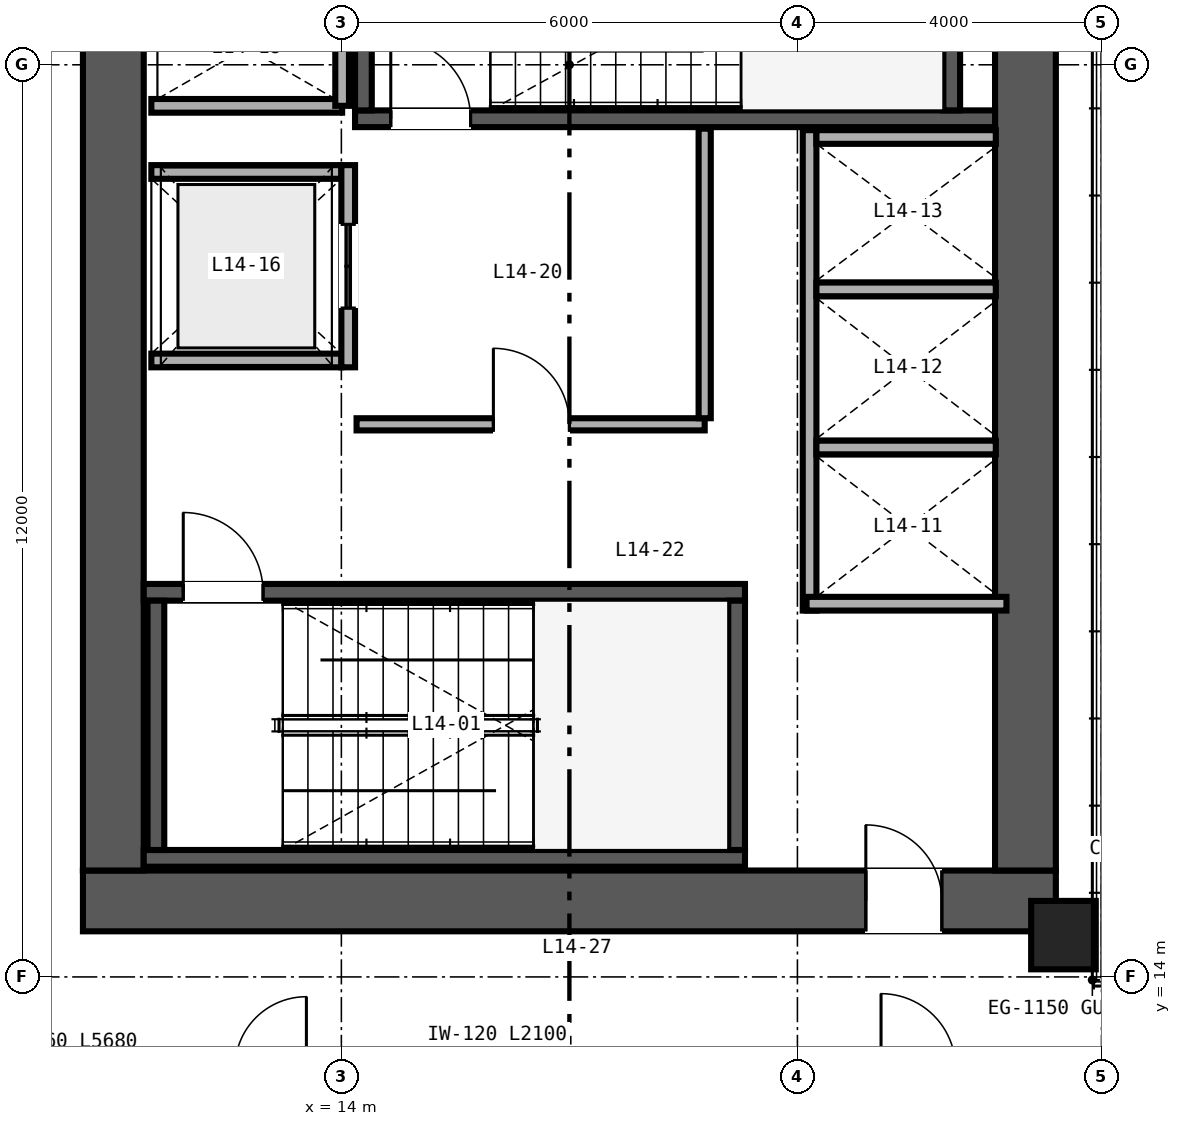
"""IFC4 building model, lengths in metres.
Left out: names, types, materials, properties, quantities, classifications, styles, units other than length and angle.
Written with IfcOpenShell. Run it as: python <this file> out.ifc"""

import sys

from ifc_helpers import new_model, si_unit, direction, frame, frame_2d, origin, origin_2d, place, context, subcontext, project, spatial, rectangle, hollow_rectangle, extrude, source, transform, mapped, element, fill, save


model = new_model("IFC4")
c1 = context("Model", 3, precision=1e-05, world=origin(), true_north=direction((0.0, 1.0)))
c2 = subcontext(c1, "Body", "Model", "MODEL_VIEW")
j1 = project(units=[si_unit("LENGTHUNIT", "METRE"), si_unit("PLANEANGLEUNIT", "RADIAN")], contexts=[c1])
p1 = place(None, origin())
s1 = spatial("IfcSite", under=j1, at=p1, CompositionType="ELEMENT")
p2 = place(p1, origin())
s2 = spatial("IfcBuilding", under=s1, at=p2, CompositionType="ELEMENT")
p3 = place(p2, frame((0.0, 0.0, 60.0)))
s3 = spatial("IfcBuildingStorey", under=s2, at=p3, CompositionType="ELEMENT", Elevation=60.0)
p4 = place(p3, frame((10.6, 15.0, 0.0), z_axis=(0.0, 0.0, 1.0), x_axis=(1.0, 0.0, 0.0)))
e1 = element("IfcWall", 1, at=p4, inside=s3, PredefinedType="SHEAR", context=c2, shape_type="SweptSolid", body=[
    extrude(rectangle(XDim=12.8, YDim=0.8, at=frame_2d((6.4, 0.0))), origin(), (0.0, 0.0, 1.0), 3.35),
])
p5 = place(p4, frame((10.3, 0.0, 0.0)))
e2 = element("IfcOpeningElement", 2, at=p5, cuts=e1, PredefinedType="OPENING", context=c2, shape_type="SweptSolid", body=[
    extrude(rectangle(XDim=1.0, YDim=2.15, at=frame_2d((0.5, 1.075))), frame((0.0, 0.41, 0.0), z_axis=(0.0, -1.0, 0.0), x_axis=(1.0, 0.0, 0.0)), (0.0, 0.0, 1.0), 0.82),
])
for number, where, z_axis, x_axis in (
    (3, (11.0, 15.4, 0.0), (0.0, 0.0, 1.0), (0.0, 1.0, 0.0)),
    (4, (23.0, 15.4, 0.0), (0.0, 0.0, 1.0), (0.0, 1.0, 0.0)),
):
    element("IfcWall", number, at=place(p3, frame(where, z_axis=z_axis, x_axis=x_axis)), inside=s3, PredefinedType="SHEAR", context=c2, shape_type="SweptSolid", body=[
        extrude(rectangle(XDim=21.2, YDim=0.8, at=frame_2d((10.6, 0.0))), origin(), (0.0, 0.0, 1.0), 3.35),
    ])
p6 = place(p3, frame((11.4, 15.56, 0.0), z_axis=(0.0, 0.0, 1.0), x_axis=(1.0, 0.0, 0.0)))
e5 = element("IfcWall", 5, at=p6, inside=s3, PredefinedType="SHEAR", context=c2, shape_type="SweptSolid", body=[
    extrude(rectangle(XDim=7.91, YDim=0.22, at=frame_2d((3.955, 0.0))), origin(), (0.0, 0.0, 1.0), 3.4),
])
p7 = place(p3, frame((11.4, 19.06, 0.0), z_axis=(0.0, 0.0, 1.0), x_axis=(1.0, 0.0, 0.0)))
e6 = element("IfcWall", 6, at=p7, inside=s3, PredefinedType="SHEAR", context=c2, shape_type="SweptSolid", body=[
    extrude(rectangle(XDim=7.91, YDim=0.22, at=frame_2d((3.955, 0.0))), origin(), (0.0, 0.0, 1.0), 3.4),
])
p8 = place(p7, frame((0.52, 0.0, 0.0)))
e7 = element("IfcOpeningElement", 7, at=p8, cuts=e6, PredefinedType="OPENING", context=c2, shape_type="SweptSolid", body=[
    extrude(rectangle(XDim=1.05, YDim=2.15, at=frame_2d((0.525, 1.075))), frame((0.0, 0.12, 0.0), z_axis=(0.0, -1.0, 0.0), x_axis=(1.0, 0.0, 0.0)), (0.0, 0.0, 1.0), 0.24),
])
for number, where, z_axis, x_axis in (
    (8, (11.56, 15.67, 0.0), (0.0, 0.0, 1.0), (0.0, 1.0, 0.0)),
    (9, (19.2, 15.67, 0.0), (0.0, 0.0, 1.0), (0.0, 1.0, 0.0)),
):
    element("IfcWall", number, at=place(p3, frame(where, z_axis=z_axis, x_axis=x_axis)), inside=s3, PredefinedType="SHEAR", context=c2, shape_type="SweptSolid", body=[
        extrude(rectangle(XDim=3.28, YDim=0.22, at=frame_2d((1.64, 0.0))), origin(), (0.0, 0.0, 1.0), 3.4),
    ])
p9 = place(p3, frame((14.18, 25.29, 0.0), z_axis=(0.0, 0.0, 1.0), x_axis=(1.0, 0.0, 0.0)))
e10 = element("IfcWall", 10, at=p9, inside=s3, PredefinedType="SHEAR", context=c2, shape_type="SweptSolid", body=[
    extrude(rectangle(XDim=8.42, YDim=0.22, at=frame_2d((4.21, 0.0))), origin(), (0.0, 0.0, 1.0), 3.4),
])
p10 = place(p9, frame((0.47, 0.0, 0.0)))
e11 = element("IfcOpeningElement", 11, at=p10, cuts=e10, PredefinedType="OPENING", context=c2, shape_type="SweptSolid", body=[
    extrude(rectangle(XDim=1.05, YDim=2.15, at=frame_2d((0.525, 1.075))), frame((0.0, 0.12, 0.0), z_axis=(0.0, -1.0, 0.0), x_axis=(1.0, 0.0, 0.0)), (0.0, 0.0, 1.0), 0.24),
])
for number, where, z_axis, x_axis in (
    (12, (14.29, 25.4, 0.0), (0.0, 0.0, 1.0), (0.0, 1.0, 0.0)),
    (13, (22.03, 25.4, 0.0), (0.0, 0.0, 1.0), (0.0, 1.0, 0.0)),
):
    element("IfcWall", number, at=place(p3, frame(where, z_axis=z_axis, x_axis=x_axis)), inside=s3, PredefinedType="SHEAR", context=c2, shape_type="SweptSolid", body=[
        extrude(rectangle(XDim=3.28, YDim=0.22, at=frame_2d((1.64, 0.0))), origin(), (0.0, 0.0, 1.0), 3.4),
    ])
m1 = source(origin(), c2, "Body", "SweptSolid", [
    extrude(hollow_rectangle(XDim=0.85, YDim=0.9, WallThickness=0.04, at=origin_2d()), origin(), (0.0, 0.0, 1.0), 3.35),
])
p11 = place(p3, frame((23.5, 14.55, 0.0), z_axis=(0.0, 0.0, 1.0), x_axis=(1.0, 0.0, 0.0)))
e14 = element("IfcColumn", 14, at=p11, inside=s3, PredefinedType="COLUMN", context=c2, shape_type="MappedRepresentation", body=[
    mapped(m1, transform((0.0, 0.0, 0.0), scale=1.0)),
])
p12 = place(p3, frame((20.16, 18.82, 0.0), z_axis=(0.0, 0.0, 1.0), x_axis=(0.0, 1.0, 0.0)))
e15 = element("IfcWall", 15, at=p12, inside=s3, PredefinedType="SOLIDWALL", context=c2, shape_type="SweptSolid", body=[
    extrude(rectangle(XDim=6.32, YDim=0.18, at=frame_2d((3.16, 0.0))), origin(), (0.0, 0.0, 1.0), 2.36),
])
p13 = place(p3, frame((20.12, 18.91, 0.0), z_axis=(0.0, 0.0, 1.0), x_axis=(1.0, 0.0, 0.0)))
e16 = element("IfcWall", 16, at=p13, inside=s3, PredefinedType="SOLIDWALL", context=c2, shape_type="SweptSolid", body=[
    extrude(rectangle(XDim=2.63, YDim=0.18, at=frame_2d((1.315, 0.0))), origin(), (0.0, 0.0, 1.0), 3.35),
])
p14 = place(p3, frame((20.25, 25.05, 0.0), z_axis=(0.0, 0.0, 1.0), x_axis=(1.0, 0.0, 0.0)))
e17 = element("IfcWall", 17, at=p14, inside=s3, PredefinedType="SOLIDWALL", context=c2, shape_type="SweptSolid", body=[
    extrude(rectangle(XDim=2.36, YDim=0.18, at=frame_2d((1.18, 0.0))), origin(), (0.0, 0.0, 1.0), 3.35),
])
p15 = place(p3, frame((20.25, 20.965, 0.0), z_axis=(0.0, 0.0, 1.0), x_axis=(1.0, 0.0, 0.0)))
e18 = element("IfcWall", 18, at=p15, inside=s3, PredefinedType="SOLIDWALL", context=c2, shape_type="SweptSolid", body=[
    extrude(rectangle(XDim=2.36, YDim=0.18, at=frame_2d((1.18, 0.0))), origin(), (0.0, 0.0, 1.0), 2.36),
])
p16 = place(p3, frame((20.25, 23.045, 0.0), z_axis=(0.0, 0.0, 1.0), x_axis=(1.0, 0.0, 0.0)))
e19 = element("IfcWall", 19, at=p16, inside=s3, PredefinedType="SOLIDWALL", context=c2, shape_type="SweptSolid", body=[
    extrude(rectangle(XDim=2.36, YDim=0.18, at=frame_2d((1.18, 0.0))), origin(), (0.0, 0.0, 1.0), 3.35),
])
for number, where, z_axis, x_axis in (
    (20, (11.5, 22.11, 0.0), (0.0, 0.0, 1.0), (1.0, 0.0, 0.0)),
    (21, (11.5, 24.59, 0.0), (0.0, 0.0, 1.0), (1.0, 0.0, 0.0)),
):
    element("IfcWall", number, at=place(p3, frame(where, z_axis=z_axis, x_axis=x_axis)), inside=s3, PredefinedType="SOLIDWALL", context=c2, shape_type="SweptSolid", body=[
        extrude(rectangle(XDim=2.5, YDim=0.18, at=frame_2d((1.25, 0.0))), origin(), (0.0, 0.0, 1.0), 3.35),
    ])
p17 = place(p3, frame((14.09, 22.02, 0.0), z_axis=(0.0, 0.0, 1.0), x_axis=(0.0, 1.0, 0.0)))
e22 = element("IfcWall", 22, at=p17, inside=s3, PredefinedType="SOLIDWALL", context=c2, shape_type="SweptSolid", body=[
    extrude(rectangle(XDim=2.66, YDim=0.18, at=frame_2d((1.33, 0.0))), origin(), (0.0, 0.0, 1.0), 3.35),
])
p18 = place(p17, frame((0.78, 0.0, 0.0)))
e23 = element("IfcOpeningElement", 23, at=p18, cuts=e22, PredefinedType="OPENING", context=c2, shape_type="SweptSolid", body=[
    extrude(rectangle(XDim=1.1, YDim=2.2, at=frame_2d((0.55, 1.1))), frame((0.0, 0.1, 0.0), z_axis=(0.0, -1.0, 0.0), x_axis=(1.0, 0.0, 0.0)), (0.0, 0.0, 1.0), 0.2),
])
p19 = place(p3, frame((11.5, 25.46, 0.0), z_axis=(0.0, 0.0, 1.0), x_axis=(1.0, 0.0, 0.0)))
e24 = element("IfcWall", 24, at=p19, inside=s3, PredefinedType="SOLIDWALL", context=c2, shape_type="SweptSolid", body=[
    extrude(rectangle(XDim=2.51, YDim=0.18, at=frame_2d((1.255, 0.0))), origin(), (0.0, 0.0, 1.0), 3.35),
])
p20 = place(p3, frame((14.01, 25.46, 0.0), z_axis=(0.0, 0.0, 1.0), x_axis=(0.0, 1.0, 0.0)))
e25 = element("IfcWall", 25, at=p20, inside=s3, PredefinedType="SOLIDWALL", context=c2, shape_type="SweptSolid", body=[
    extrude(rectangle(XDim=3.08, YDim=0.18, at=frame_2d((1.54, 0.0))), origin(), (0.0, 0.0, 1.0), 3.35),
])
p21 = place(p3, frame((14.2, 21.27, 0.0), z_axis=(0.0, 0.0, 1.0), x_axis=(1.0, 0.0, 0.0)))
e26 = element("IfcWall", 26, at=p21, inside=s3, PredefinedType="PARTITIONING", context=c2, shape_type="SweptSolid", body=[
    extrude(rectangle(XDim=4.58, YDim=0.16, at=frame_2d((2.29, 0.0))), origin(), (0.0, 0.0, 1.0), 3.35),
])
p22 = place(p21, frame((1.8, 0.0, 0.0)))
e27 = element("IfcOpeningElement", 27, at=p22, cuts=e26, PredefinedType="OPENING", context=c2, shape_type="SweptSolid", body=[
    extrude(rectangle(XDim=1.0, YDim=2.15, at=frame_2d((0.5, 1.075))), frame((0.0, 0.09, 0.0), z_axis=(0.0, -1.0, 0.0), x_axis=(1.0, 0.0, 0.0)), (0.0, 0.0, 1.0), 0.18),
])
p23 = place(p3, frame((18.78, 21.35, 0.0), z_axis=(0.0, 0.0, 1.0), x_axis=(0.0, 1.0, 0.0)))
e28 = element("IfcWall", 28, at=p23, inside=s3, PredefinedType="PARTITIONING", context=c2, shape_type="SweptSolid", body=[
    extrude(rectangle(XDim=3.81, YDim=0.16, at=frame_2d((1.905, 0.0))), origin(), (0.0, 0.0, 1.0), 3.35),
])
m2 = source(origin(), c2, "Body", "SweptSolid", [
    extrude(rectangle(XDim=1.05, YDim=2.15, at=frame_2d((0.525, 1.075))), frame((0.0, 0.025, 0.0), z_axis=(0.0, -1.0, 0.0), x_axis=(1.0, 0.0, 0.0)), (0.0, 0.0, 1.0), 0.05),
])
p24 = place(p8, origin())
e29 = element("IfcDoor", 29, at=p24, inside=s3, OperationType="SINGLE_SWING_LEFT", PredefinedType="DOOR", context=c2, shape_type="MappedRepresentation", body=[
    mapped(m2, transform((0.0, 0.0, 0.0), scale=1.0)),
])
fill(e7, e29)
p25 = place(p10, origin())
e30 = element("IfcDoor", 30, at=p25, inside=s3, OperationType="SINGLE_SWING_LEFT", PredefinedType="DOOR", context=c2, shape_type="MappedRepresentation", body=[
    mapped(m2, transform((0.0, 0.0, 0.0), scale=1.0)),
])
fill(e11, e30)
m3 = source(origin(), c2, "Body", "SweptSolid", [
    extrude(rectangle(XDim=1.1, YDim=2.2, at=frame_2d((0.55, 1.1))), frame((0.0, 0.025, 0.0), z_axis=(0.0, -1.0, 0.0), x_axis=(1.0, 0.0, 0.0)), (0.0, 0.0, 1.0), 0.05),
])
p26 = place(p18, origin())
e31 = element("IfcDoor", 31, at=p26, inside=s3, OperationType="DOUBLE_DOOR_SLIDING", PredefinedType="DOOR", context=c2, shape_type="MappedRepresentation", body=[
    mapped(m3, transform((0.0, 0.0, 0.0), scale=1.0)),
])
fill(e23, e31)
m4 = source(origin(), c2, "Body", "SweptSolid", [
    extrude(rectangle(XDim=1.0, YDim=2.15, at=frame_2d((0.5, 1.075))), frame((0.0, 0.025, 0.0), z_axis=(0.0, -1.0, 0.0), x_axis=(1.0, 0.0, 0.0)), (0.0, 0.0, 1.0), 0.05),
])
p27 = place(p22, origin())
e32 = element("IfcDoor", 32, at=p27, inside=s3, OperationType="SINGLE_SWING_LEFT", PredefinedType="DOOR", context=c2, shape_type="MappedRepresentation", body=[
    mapped(m4, transform((0.0, 0.0, 0.0), scale=1.0)),
])
fill(e27, e32)
p28 = place(p5, origin())
e33 = element("IfcDoor", 33, at=p28, inside=s3, OperationType="SINGLE_SWING_LEFT", PredefinedType="DOOR", context=c2, shape_type="MappedRepresentation", body=[
    mapped(m4, transform((0.0, 0.0, 0.0), scale=1.0)),
])
fill(e2, e33)
save(model, sys.argv[1])
